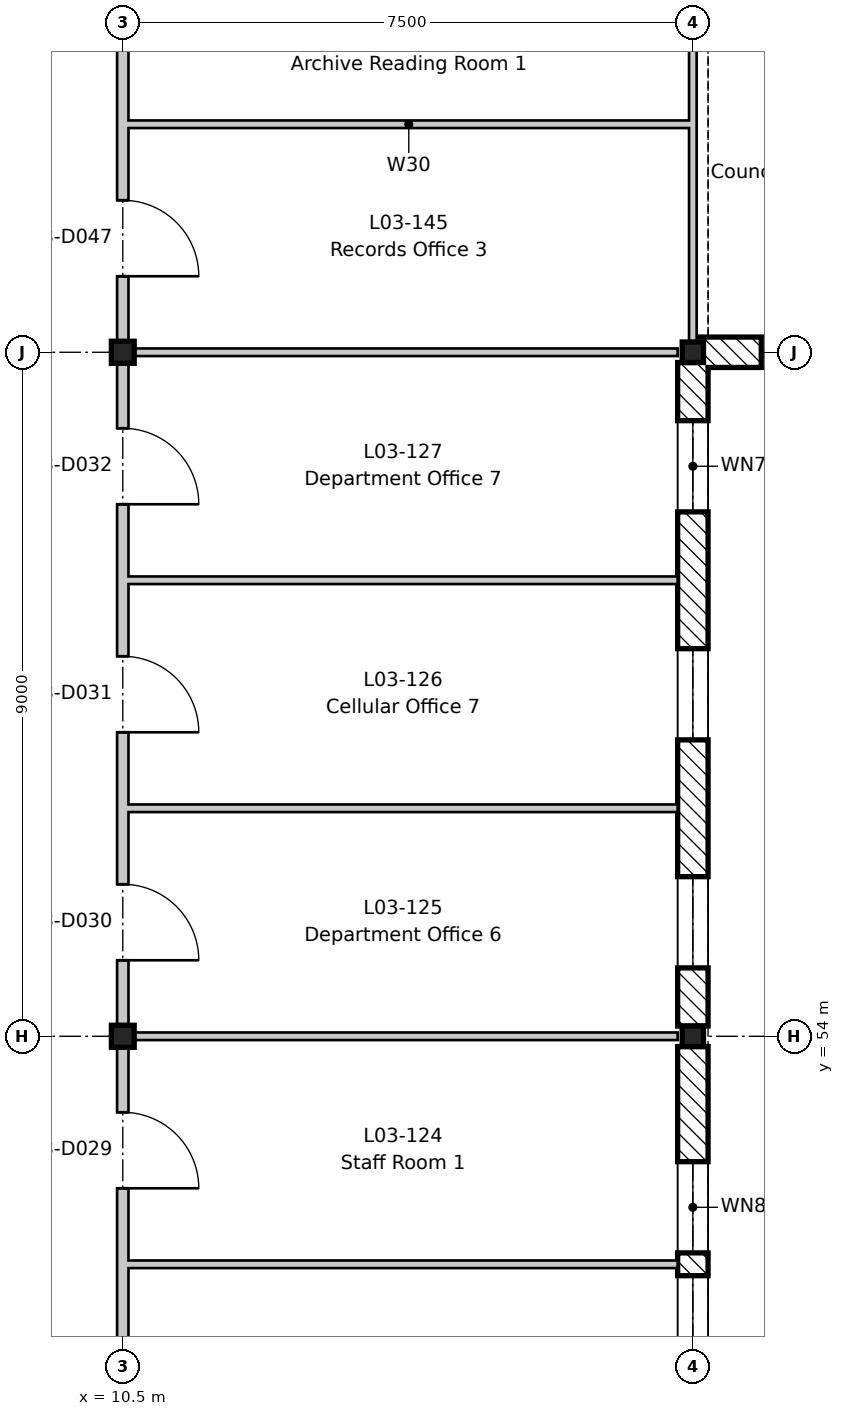
"""IFC4 building model, lengths in metres.
Left out: names, types, materials, properties, quantities, classifications, styles, units other than length and angle.
Written with IfcOpenShell. Run it as: python <this file> out.ifc"""

import sys

from ifc_helpers import new_model, si_unit, direction, frame, frame_2d, origin, origin_2d, place, context, subcontext, project, spatial, rectangle, i_section, extrude, element, fill, save


model = new_model("IFC4")
c1 = context("Model", 3, precision=1e-05, world=origin(), true_north=direction((0.0, 1.0)))
c2 = subcontext(c1, "Body", "Model", "MODEL_VIEW")
j1 = project(units=[si_unit("LENGTHUNIT", "METRE"), si_unit("PLANEANGLEUNIT", "RADIAN")], contexts=[c1])
p1 = place(None, origin())
s1 = spatial("IfcSite", under=j1, at=p1, CompositionType="ELEMENT")
p2 = place(p1, origin())
s2 = spatial("IfcBuilding", under=s1, at=p2, CompositionType="ELEMENT")
p3 = place(p2, frame((0.0, 0.0, 14.4)))
s3 = spatial("IfcBuildingStorey", under=s2, at=p3, CompositionType="ELEMENT", Elevation=14.4)
for number, where, z_axis, x_axis in (
    (1, (10.5, 54.0, -0.2), (0.0, 0.0, 1.0), (1.0, 0.0, 0.0)),
    (2, (10.5, 63.0, -0.2), (0.0, 0.0, 1.0), (1.0, 0.0, 0.0)),
):
    element("IfcColumn", number, at=place(p3, frame(where, z_axis=z_axis, x_axis=x_axis)), inside=s3, PredefinedType="COLUMN", context=c2, shape_type="SweptSolid", body=[
        extrude(i_section(OverallWidth=0.3, OverallDepth=0.29, WebThickness=0.009, FlangeThickness=0.014, FilletRadius=0.027, at=origin_2d()), origin(), (0.0, 0.0, 1.0), 4.2),
    ])
for number, where, z_axis, x_axis in (
    (3, (18.0, 54.0, -0.2), (0.0, 0.0, 1.0), (1.0, 0.0, 0.0)),
    (4, (18.0, 63.0, -0.2), (0.0, 0.0, 1.0), (1.0, 0.0, 0.0)),
):
    element("IfcColumn", number, at=place(p3, frame(where, z_axis=z_axis, x_axis=x_axis)), inside=s3, PredefinedType="COLUMN", context=c2, shape_type="SweptSolid", body=[
        extrude(i_section(OverallWidth=0.28, OverallDepth=0.27, WebThickness=0.008, FlangeThickness=0.013, FilletRadius=0.024, at=origin_2d()), origin(), (0.0, 0.0, 1.0), 4.2),
    ])
p4 = place(p3, frame((18.0, 53.865, 0.0), z_axis=(0.0, 0.0, 1.0), x_axis=(0.0, -1.0, 0.0)))
e5 = element("IfcWall", 5, at=p4, inside=s3, PredefinedType="STANDARD", context=c2, shape_type="SweptSolid", body=[
    extrude(rectangle(XDim=8.73, YDim=0.4, at=frame_2d((4.365, 0.0))), origin(), (0.0, 0.0, 1.0), 3.6),
])
p5 = place(p4, frame((6.015, 0.0, 0.6)))
e6 = element("IfcOpeningElement", 6, at=p5, cuts=e5, PredefinedType="OPENING", context=c2, shape_type="SweptSolid", body=[
    extrude(rectangle(XDim=1.2, YDim=2.7, at=frame_2d((0.6, 1.35))), frame((0.0, 0.21, 0.0), z_axis=(0.0, -1.0, 0.0), x_axis=(1.0, 0.0, 0.0)), (0.0, 0.0, 1.0), 0.42),
])
p6 = place(p4, frame((4.515, 0.0, 0.6)))
e7 = element("IfcOpeningElement", 7, at=p6, cuts=e5, PredefinedType="OPENING", context=c2, shape_type="SweptSolid", body=[
    extrude(rectangle(XDim=1.2, YDim=2.7, at=frame_2d((0.6, 1.35))), frame((0.0, 0.21, 0.0), z_axis=(0.0, -1.0, 0.0), x_axis=(1.0, 0.0, 0.0)), (0.0, 0.0, 1.0), 0.42),
])
p7 = place(p4, frame((3.015, 0.0, 0.6)))
e8 = element("IfcOpeningElement", 8, at=p7, cuts=e5, PredefinedType="OPENING", context=c2, shape_type="SweptSolid", body=[
    extrude(rectangle(XDim=1.2, YDim=2.7, at=frame_2d((0.6, 1.35))), frame((0.0, 0.21, 0.0), z_axis=(0.0, -1.0, 0.0), x_axis=(1.0, 0.0, 0.0)), (0.0, 0.0, 1.0), 0.42),
])
p8 = place(p4, frame((1.515, 0.0, 0.6)))
e9 = element("IfcOpeningElement", 9, at=p8, cuts=e5, PredefinedType="OPENING", context=c2, shape_type="SweptSolid", body=[
    extrude(rectangle(XDim=1.2, YDim=2.7, at=frame_2d((0.6, 1.35))), frame((0.0, 0.21, 0.0), z_axis=(0.0, -1.0, 0.0), x_axis=(1.0, 0.0, 0.0)), (0.0, 0.0, 1.0), 0.42),
])
p9 = place(p3, frame((18.0, 62.865, 0.0), z_axis=(0.0, 0.0, 1.0), x_axis=(0.0, -1.0, 0.0)))
e10 = element("IfcWall", 10, at=p9, inside=s3, PredefinedType="STANDARD", context=c2, shape_type="SweptSolid", body=[
    extrude(rectangle(XDim=8.73, YDim=0.4, at=frame_2d((4.365, 0.0))), origin(), (0.0, 0.0, 1.0), 3.6),
])
p10 = place(p9, frame((6.765, 0.0, 0.9)))
e11 = element("IfcOpeningElement", 11, at=p10, cuts=e10, PredefinedType="OPENING", context=c2, shape_type="SweptSolid", body=[
    extrude(rectangle(XDim=1.2, YDim=2.4, at=frame_2d((0.6, 1.2))), frame((0.0, 0.21, 0.0), z_axis=(0.0, -1.0, 0.0), x_axis=(1.0, 0.0, 0.0)), (0.0, 0.0, 1.0), 0.42),
])
p11 = place(p9, frame((3.765, 0.0, 0.9)))
e12 = element("IfcOpeningElement", 12, at=p11, cuts=e10, PredefinedType="OPENING", context=c2, shape_type="SweptSolid", body=[
    extrude(rectangle(XDim=1.2, YDim=2.4, at=frame_2d((0.6, 1.2))), frame((0.0, 0.21, 0.0), z_axis=(0.0, -1.0, 0.0), x_axis=(1.0, 0.0, 0.0)), (0.0, 0.0, 1.0), 0.42),
])
p12 = place(p9, frame((0.765, 0.0, 0.9)))
e13 = element("IfcOpeningElement", 13, at=p12, cuts=e10, PredefinedType="OPENING", context=c2, shape_type="SweptSolid", body=[
    extrude(rectangle(XDim=1.2, YDim=2.4, at=frame_2d((0.6, 1.2))), frame((0.0, 0.21, 0.0), z_axis=(0.0, -1.0, 0.0), x_axis=(1.0, 0.0, 0.0)), (0.0, 0.0, 1.0), 0.42),
])
p13 = place(p3, frame((26.991, 63.0, 0.0), z_axis=(0.0, 0.0, 1.0), x_axis=(-1.0, 0.0, 0.0)))
e14 = element("IfcWall", 14, at=p13, inside=s3, PredefinedType="STANDARD", context=c2, shape_type="SweptSolid", body=[
    extrude(rectangle(XDim=8.982, YDim=0.4, at=frame_2d((4.491, 0.0))), origin(), (0.0, 0.0, 1.0), 3.6),
])
p14 = place(p13, frame((6.891, 0.0, 0.9)))
e15 = element("IfcOpeningElement", 15, at=p14, cuts=e14, PredefinedType="OPENING", context=c2, shape_type="SweptSolid", body=[
    extrude(rectangle(XDim=1.2, YDim=2.4, at=frame_2d((0.6, 1.2))), frame((0.0, 0.21, 0.0), z_axis=(0.0, -1.0, 0.0), x_axis=(1.0, 0.0, 0.0)), (0.0, 0.0, 1.0), 0.42),
])
p15 = place(p13, frame((3.891, 0.0, 0.9)))
e16 = element("IfcOpeningElement", 16, at=p15, cuts=e14, PredefinedType="OPENING", context=c2, shape_type="SweptSolid", body=[
    extrude(rectangle(XDim=1.2, YDim=2.4, at=frame_2d((0.6, 1.2))), frame((0.0, 0.21, 0.0), z_axis=(0.0, -1.0, 0.0), x_axis=(1.0, 0.0, 0.0)), (0.0, 0.0, 1.0), 0.42),
])
p16 = place(p13, frame((0.891, 0.0, 0.9)))
e17 = element("IfcOpeningElement", 17, at=p16, cuts=e14, PredefinedType="OPENING", context=c2, shape_type="SweptSolid", body=[
    extrude(rectangle(XDim=1.2, YDim=2.4, at=frame_2d((0.6, 1.2))), frame((0.0, 0.21, 0.0), z_axis=(0.0, -1.0, 0.0), x_axis=(1.0, 0.0, 0.0)), (0.0, 0.0, 1.0), 0.42),
])
p17 = place(p3, frame((10.575, 51.0, 0.0), z_axis=(0.0, 0.0, 1.0), x_axis=(1.0, 0.0, 0.0)))
e18 = element("IfcWall", 18, at=p17, inside=s3, PredefinedType="PARTITIONING", context=c2, shape_type="SweptSolid", body=[
    extrude(rectangle(XDim=7.225, YDim=0.1, at=frame_2d((3.613, 0.0))), origin(), (0.0, 0.0, 1.0), 4.0),
])
p18 = place(p3, frame((10.575, 54.0, 0.0), z_axis=(0.0, 0.0, 1.0), x_axis=(1.0, 0.0, 0.0)))
e19 = element("IfcWall", 19, at=p18, inside=s3, PredefinedType="PARTITIONING", context=c2, shape_type="SweptSolid", body=[
    extrude(rectangle(XDim=7.225, YDim=0.1, at=frame_2d((3.613, 0.0))), origin(), (0.0, 0.0, 1.0), 3.65),
])
for number, where, z_axis, x_axis in (
    (20, (10.575, 57.0, 0.0), (0.0, 0.0, 1.0), (1.0, 0.0, 0.0)),
    (21, (10.575, 60.0, 0.0), (0.0, 0.0, 1.0), (1.0, 0.0, 0.0)),
):
    element("IfcWall", number, at=place(p3, frame(where, z_axis=z_axis, x_axis=x_axis)), inside=s3, PredefinedType="PARTITIONING", context=c2, shape_type="SweptSolid", body=[
        extrude(rectangle(XDim=7.225, YDim=0.1, at=frame_2d((3.613, 0.0))), origin(), (0.0, 0.0, 1.0), 4.0),
    ])
p19 = place(p3, frame((10.575, 63.0, 0.0), z_axis=(0.0, 0.0, 1.0), x_axis=(1.0, 0.0, 0.0)))
e22 = element("IfcWall", 22, at=p19, inside=s3, PredefinedType="PARTITIONING", context=c2, shape_type="SweptSolid", body=[
    extrude(rectangle(XDim=7.225, YDim=0.1, at=frame_2d((3.613, 0.0))), origin(), (0.0, 0.0, 1.0), 3.65),
])
p20 = place(p3, frame((10.5, -8.8, 0.0), z_axis=(0.0, 0.0, 1.0), x_axis=(0.0, 1.0, 0.0)))
e23 = element("IfcWall", 23, at=p20, inside=s3, PredefinedType="PARTITIONING", context=c2, shape_type="SweptSolid", body=[
    extrude(rectangle(XDim=79.3, YDim=0.15, at=frame_2d((39.65, 0.0))), origin(), (0.0, 0.0, 1.0), 3.48),
])
p21 = place(p20, frame((3.6, 0.0, 0.0)))
e24 = element("IfcOpeningElement", 24, at=p21, cuts=e23, PredefinedType="OPENING", context=c2, shape_type="SweptSolid", body=[
    extrude(rectangle(XDim=1.4, YDim=2.1, at=frame_2d((0.7, 1.05))), frame((0.0, 0.085, 0.0), z_axis=(0.0, -1.0, 0.0), x_axis=(1.0, 0.0, 0.0)), (0.0, 0.0, 1.0), 0.17),
])
p22 = place(p20, frame((9.8, 0.0, 0.0)))
e25 = element("IfcOpeningElement", 25, at=p22, cuts=e23, PredefinedType="OPENING", context=c2, shape_type="SweptSolid", body=[
    extrude(rectangle(XDim=1.0, YDim=2.1, at=frame_2d((0.5, 1.05))), frame((0.0, 0.085, 0.0), z_axis=(0.0, -1.0, 0.0), x_axis=(1.0, 0.0, 0.0)), (0.0, 0.0, 1.0), 0.17),
])
p23 = place(p20, frame((12.8, 0.0, 0.0)))
e26 = element("IfcOpeningElement", 26, at=p23, cuts=e23, PredefinedType="OPENING", context=c2, shape_type="SweptSolid", body=[
    extrude(rectangle(XDim=1.0, YDim=2.1, at=frame_2d((0.5, 1.05))), frame((0.0, 0.085, 0.0), z_axis=(0.0, -1.0, 0.0), x_axis=(1.0, 0.0, 0.0)), (0.0, 0.0, 1.0), 0.17),
])
p24 = place(p20, frame((15.8, 0.0, 0.0)))
e27 = element("IfcOpeningElement", 27, at=p24, cuts=e23, PredefinedType="OPENING", context=c2, shape_type="SweptSolid", body=[
    extrude(rectangle(XDim=1.0, YDim=2.1, at=frame_2d((0.5, 1.05))), frame((0.0, 0.085, 0.0), z_axis=(0.0, -1.0, 0.0), x_axis=(1.0, 0.0, 0.0)), (0.0, 0.0, 1.0), 0.17),
])
p25 = place(p20, frame((18.8, 0.0, 0.0)))
e28 = element("IfcOpeningElement", 28, at=p25, cuts=e23, PredefinedType="OPENING", context=c2, shape_type="SweptSolid", body=[
    extrude(rectangle(XDim=1.0, YDim=2.1, at=frame_2d((0.5, 1.05))), frame((0.0, 0.085, 0.0), z_axis=(0.0, -1.0, 0.0), x_axis=(1.0, 0.0, 0.0)), (0.0, 0.0, 1.0), 0.17),
])
p26 = place(p20, frame((21.8, 0.0, 0.0)))
e29 = element("IfcOpeningElement", 29, at=p26, cuts=e23, PredefinedType="OPENING", context=c2, shape_type="SweptSolid", body=[
    extrude(rectangle(XDim=1.0, YDim=2.1, at=frame_2d((0.5, 1.05))), frame((0.0, 0.085, 0.0), z_axis=(0.0, -1.0, 0.0), x_axis=(1.0, 0.0, 0.0)), (0.0, 0.0, 1.0), 0.17),
])
p27 = place(p20, frame((27.6, 0.0, 0.0)))
e30 = element("IfcOpeningElement", 30, at=p27, cuts=e23, PredefinedType="OPENING", context=c2, shape_type="SweptSolid", body=[
    extrude(rectangle(XDim=1.4, YDim=2.1, at=frame_2d((0.7, 1.05))), frame((0.0, 0.085, 0.0), z_axis=(0.0, -1.0, 0.0), x_axis=(1.0, 0.0, 0.0)), (0.0, 0.0, 1.0), 0.17),
])
p28 = place(p20, frame((36.55, 0.0, 0.0)))
e31 = element("IfcOpeningElement", 31, at=p28, cuts=e23, PredefinedType="OPENING", context=c2, shape_type="SweptSolid", body=[
    extrude(rectangle(XDim=1.0, YDim=2.1, at=frame_2d((0.5, 1.05))), frame((0.0, 0.085, 0.0), z_axis=(0.0, -1.0, 0.0), x_axis=(1.0, 0.0, 0.0)), (0.0, 0.0, 1.0), 0.17),
])
p29 = place(p20, frame((39.8, 0.0, 0.0)))
e32 = element("IfcOpeningElement", 32, at=p29, cuts=e23, PredefinedType="OPENING", context=c2, shape_type="SweptSolid", body=[
    extrude(rectangle(XDim=1.0, YDim=2.1, at=frame_2d((0.5, 1.05))), frame((0.0, 0.085, 0.0), z_axis=(0.0, -1.0, 0.0), x_axis=(1.0, 0.0, 0.0)), (0.0, 0.0, 1.0), 0.17),
])
p30 = place(p20, frame((42.8, 0.0, 0.0)))
e33 = element("IfcOpeningElement", 33, at=p30, cuts=e23, PredefinedType="OPENING", context=c2, shape_type="SweptSolid", body=[
    extrude(rectangle(XDim=1.0, YDim=2.1, at=frame_2d((0.5, 1.05))), frame((0.0, 0.085, 0.0), z_axis=(0.0, -1.0, 0.0), x_axis=(1.0, 0.0, 0.0)), (0.0, 0.0, 1.0), 0.17),
])
p31 = place(p20, frame((47.3, 0.0, 0.0)))
e34 = element("IfcOpeningElement", 34, at=p31, cuts=e23, PredefinedType="OPENING", context=c2, shape_type="SweptSolid", body=[
    extrude(rectangle(XDim=1.0, YDim=2.1, at=frame_2d((0.5, 1.05))), frame((0.0, 0.085, 0.0), z_axis=(0.0, -1.0, 0.0), x_axis=(1.0, 0.0, 0.0)), (0.0, 0.0, 1.0), 0.17),
])
p32 = place(p20, frame((51.8, 0.0, 0.0)))
e35 = element("IfcOpeningElement", 35, at=p32, cuts=e23, PredefinedType="OPENING", context=c2, shape_type="SweptSolid", body=[
    extrude(rectangle(XDim=1.0, YDim=2.1, at=frame_2d((0.5, 1.05))), frame((0.0, 0.085, 0.0), z_axis=(0.0, -1.0, 0.0), x_axis=(1.0, 0.0, 0.0)), (0.0, 0.0, 1.0), 0.17),
])
p33 = place(p20, frame((56.3, 0.0, 0.0)))
e36 = element("IfcOpeningElement", 36, at=p33, cuts=e23, PredefinedType="OPENING", context=c2, shape_type="SweptSolid", body=[
    extrude(rectangle(XDim=1.0, YDim=2.1, at=frame_2d((0.5, 1.05))), frame((0.0, 0.085, 0.0), z_axis=(0.0, -1.0, 0.0), x_axis=(1.0, 0.0, 0.0)), (0.0, 0.0, 1.0), 0.17),
])
p34 = place(p20, frame((60.8, 0.0, 0.0)))
e37 = element("IfcOpeningElement", 37, at=p34, cuts=e23, PredefinedType="OPENING", context=c2, shape_type="SweptSolid", body=[
    extrude(rectangle(XDim=1.0, YDim=2.1, at=frame_2d((0.5, 1.05))), frame((0.0, 0.085, 0.0), z_axis=(0.0, -1.0, 0.0), x_axis=(1.0, 0.0, 0.0)), (0.0, 0.0, 1.0), 0.17),
])
p35 = place(p20, frame((63.8, 0.0, 0.0)))
e38 = element("IfcOpeningElement", 38, at=p35, cuts=e23, PredefinedType="OPENING", context=c2, shape_type="SweptSolid", body=[
    extrude(rectangle(XDim=1.0, YDim=2.1, at=frame_2d((0.5, 1.05))), frame((0.0, 0.085, 0.0), z_axis=(0.0, -1.0, 0.0), x_axis=(1.0, 0.0, 0.0)), (0.0, 0.0, 1.0), 0.17),
])
p36 = place(p20, frame((66.8, 0.0, 0.0)))
e39 = element("IfcOpeningElement", 39, at=p36, cuts=e23, PredefinedType="OPENING", context=c2, shape_type="SweptSolid", body=[
    extrude(rectangle(XDim=1.0, YDim=2.1, at=frame_2d((0.5, 1.05))), frame((0.0, 0.085, 0.0), z_axis=(0.0, -1.0, 0.0), x_axis=(1.0, 0.0, 0.0)), (0.0, 0.0, 1.0), 0.17),
])
p37 = place(p20, frame((69.8, 0.0, 0.0)))
e40 = element("IfcOpeningElement", 40, at=p37, cuts=e23, PredefinedType="OPENING", context=c2, shape_type="SweptSolid", body=[
    extrude(rectangle(XDim=1.0, YDim=2.1, at=frame_2d((0.5, 1.05))), frame((0.0, 0.085, 0.0), z_axis=(0.0, -1.0, 0.0), x_axis=(1.0, 0.0, 0.0)), (0.0, 0.0, 1.0), 0.17),
])
p38 = place(p20, frame((72.8, 0.0, 0.0)))
e41 = element("IfcOpeningElement", 41, at=p38, cuts=e23, PredefinedType="OPENING", context=c2, shape_type="SweptSolid", body=[
    extrude(rectangle(XDim=1.0, YDim=2.1, at=frame_2d((0.5, 1.05))), frame((0.0, 0.085, 0.0), z_axis=(0.0, -1.0, 0.0), x_axis=(1.0, 0.0, 0.0)), (0.0, 0.0, 1.0), 0.17),
])
p39 = place(p3, frame((10.575, 66.0, 0.0), z_axis=(0.0, 0.0, 1.0), x_axis=(1.0, 0.0, 0.0)))
e42 = element("IfcWall", 42, at=p39, inside=s3, PredefinedType="PARTITIONING", context=c2, shape_type="SweptSolid", body=[
    extrude(rectangle(XDim=7.375, YDim=0.1, at=frame_2d((3.688, 0.0))), origin(), (0.0, 0.0, 1.0), 4.0),
])
p40 = place(p3, frame((18.0, 63.075, 0.0), z_axis=(0.0, 0.0, 1.0), x_axis=(0.0, 1.0, 0.0)))
e43 = element("IfcWall", 43, at=p40, inside=s3, PredefinedType="PARTITIONING", context=c2, shape_type="SweptSolid", body=[
    extrude(rectangle(XDim=7.35, YDim=0.1, at=frame_2d((3.675, 0.0))), origin(), (0.0, 0.0, 1.0), 3.58),
])
p41 = place(p7, origin())
e44 = element("IfcWindow", 44, at=p41, inside=s3, PartitioningType="SINGLE_PANEL", PredefinedType="WINDOW", context=c2, shape_type="SweptSolid", body=[
    extrude(rectangle(XDim=1.2, YDim=2.7, at=frame_2d((0.6, 1.35))), frame((0.0, 0.03, 0.0), z_axis=(0.0, -1.0, 0.0), x_axis=(1.0, 0.0, 0.0)), (0.0, 0.0, 1.0), 0.06),
])
fill(e8, e44)
p42 = place(p8, origin())
e45 = element("IfcWindow", 45, at=p42, inside=s3, PartitioningType="SINGLE_PANEL", PredefinedType="WINDOW", context=c2, shape_type="SweptSolid", body=[
    extrude(rectangle(XDim=1.2, YDim=2.7, at=frame_2d((0.6, 1.35))), frame((0.0, 0.03, 0.0), z_axis=(0.0, -1.0, 0.0), x_axis=(1.0, 0.0, 0.0)), (0.0, 0.0, 1.0), 0.06),
])
fill(e9, e45)
p43 = place(p10, origin())
e46 = element("IfcWindow", 46, at=p43, inside=s3, PartitioningType="SINGLE_PANEL", PredefinedType="WINDOW", context=c2, shape_type="SweptSolid", body=[
    extrude(rectangle(XDim=1.2, YDim=2.4, at=frame_2d((0.6, 1.2))), frame((0.0, -0.12, 0.0), z_axis=(0.0, -1.0, 0.0), x_axis=(1.0, 0.0, 0.0)), (0.0, 0.0, 1.0), 0.06),
])
fill(e11, e46)
p44 = place(p11, origin())
e47 = element("IfcWindow", 47, at=p44, inside=s3, PartitioningType="SINGLE_PANEL", PredefinedType="WINDOW", context=c2, shape_type="SweptSolid", body=[
    extrude(rectangle(XDim=1.2, YDim=2.4, at=frame_2d((0.6, 1.2))), frame((0.0, -0.12, 0.0), z_axis=(0.0, -1.0, 0.0), x_axis=(1.0, 0.0, 0.0)), (0.0, 0.0, 1.0), 0.06),
])
fill(e12, e47)
p45 = place(p12, origin())
e48 = element("IfcWindow", 48, at=p45, inside=s3, PartitioningType="SINGLE_PANEL", PredefinedType="WINDOW", context=c2, shape_type="SweptSolid", body=[
    extrude(rectangle(XDim=1.2, YDim=2.4, at=frame_2d((0.6, 1.2))), frame((0.0, -0.12, 0.0), z_axis=(0.0, -1.0, 0.0), x_axis=(1.0, 0.0, 0.0)), (0.0, 0.0, 1.0), 0.06),
])
fill(e13, e48)
p46 = place(p14, origin())
e49 = element("IfcWindow", 49, at=p46, inside=s3, PartitioningType="SINGLE_PANEL", PredefinedType="WINDOW", context=c2, shape_type="SweptSolid", body=[
    extrude(rectangle(XDim=1.2, YDim=2.4, at=frame_2d((0.6, 1.2))), frame((0.0, -0.12, 0.0), z_axis=(0.0, -1.0, 0.0), x_axis=(1.0, 0.0, 0.0)), (0.0, 0.0, 1.0), 0.06),
])
fill(e15, e49)
p47 = place(p34, frame((1.0, 0.0, 0.0), z_axis=(0.0, 0.0, 1.0), x_axis=(-1.0, 0.0, 0.0)))
e50 = element("IfcDoor", 50, at=p47, inside=s3, OperationType="SINGLE_SWING_RIGHT", PredefinedType="DOOR", context=c2, shape_type="SweptSolid", body=[
    extrude(rectangle(XDim=1.0, YDim=2.1, at=frame_2d((0.5, 1.05))), frame((0.0, 0.025, 0.0), z_axis=(0.0, -1.0, 0.0), x_axis=(1.0, 0.0, 0.0)), (0.0, 0.0, 1.0), 0.05),
])
fill(e37, e50)
p48 = place(p35, frame((1.0, 0.0, 0.0), z_axis=(0.0, 0.0, 1.0), x_axis=(-1.0, 0.0, 0.0)))
e51 = element("IfcDoor", 51, at=p48, inside=s3, OperationType="SINGLE_SWING_RIGHT", PredefinedType="DOOR", context=c2, shape_type="SweptSolid", body=[
    extrude(rectangle(XDim=1.0, YDim=2.1, at=frame_2d((0.5, 1.05))), frame((0.0, 0.025, 0.0), z_axis=(0.0, -1.0, 0.0), x_axis=(1.0, 0.0, 0.0)), (0.0, 0.0, 1.0), 0.05),
])
fill(e38, e51)
p49 = place(p36, frame((1.0, 0.0, 0.0), z_axis=(0.0, 0.0, 1.0), x_axis=(-1.0, 0.0, 0.0)))
e52 = element("IfcDoor", 52, at=p49, inside=s3, OperationType="SINGLE_SWING_RIGHT", PredefinedType="DOOR", context=c2, shape_type="SweptSolid", body=[
    extrude(rectangle(XDim=1.0, YDim=2.1, at=frame_2d((0.5, 1.05))), frame((0.0, 0.025, 0.0), z_axis=(0.0, -1.0, 0.0), x_axis=(1.0, 0.0, 0.0)), (0.0, 0.0, 1.0), 0.05),
])
fill(e39, e52)
p50 = place(p37, frame((1.0, 0.0, 0.0), z_axis=(0.0, 0.0, 1.0), x_axis=(-1.0, 0.0, 0.0)))
e53 = element("IfcDoor", 53, at=p50, inside=s3, OperationType="SINGLE_SWING_RIGHT", PredefinedType="DOOR", context=c2, shape_type="SweptSolid", body=[
    extrude(rectangle(XDim=1.0, YDim=2.1, at=frame_2d((0.5, 1.05))), frame((0.0, 0.025, 0.0), z_axis=(0.0, -1.0, 0.0), x_axis=(1.0, 0.0, 0.0)), (0.0, 0.0, 1.0), 0.05),
])
fill(e40, e53)
p51 = place(p38, frame((1.0, 0.0, 0.0), z_axis=(0.0, 0.0, 1.0), x_axis=(-1.0, 0.0, 0.0)))
e54 = element("IfcDoor", 54, at=p51, inside=s3, OperationType="SINGLE_SWING_RIGHT", PredefinedType="DOOR", context=c2, shape_type="SweptSolid", body=[
    extrude(rectangle(XDim=1.0, YDim=2.1, at=frame_2d((0.5, 1.05))), frame((0.0, 0.025, 0.0), z_axis=(0.0, -1.0, 0.0), x_axis=(1.0, 0.0, 0.0)), (0.0, 0.0, 1.0), 0.05),
])
fill(e41, e54)
save(model, sys.argv[1])
